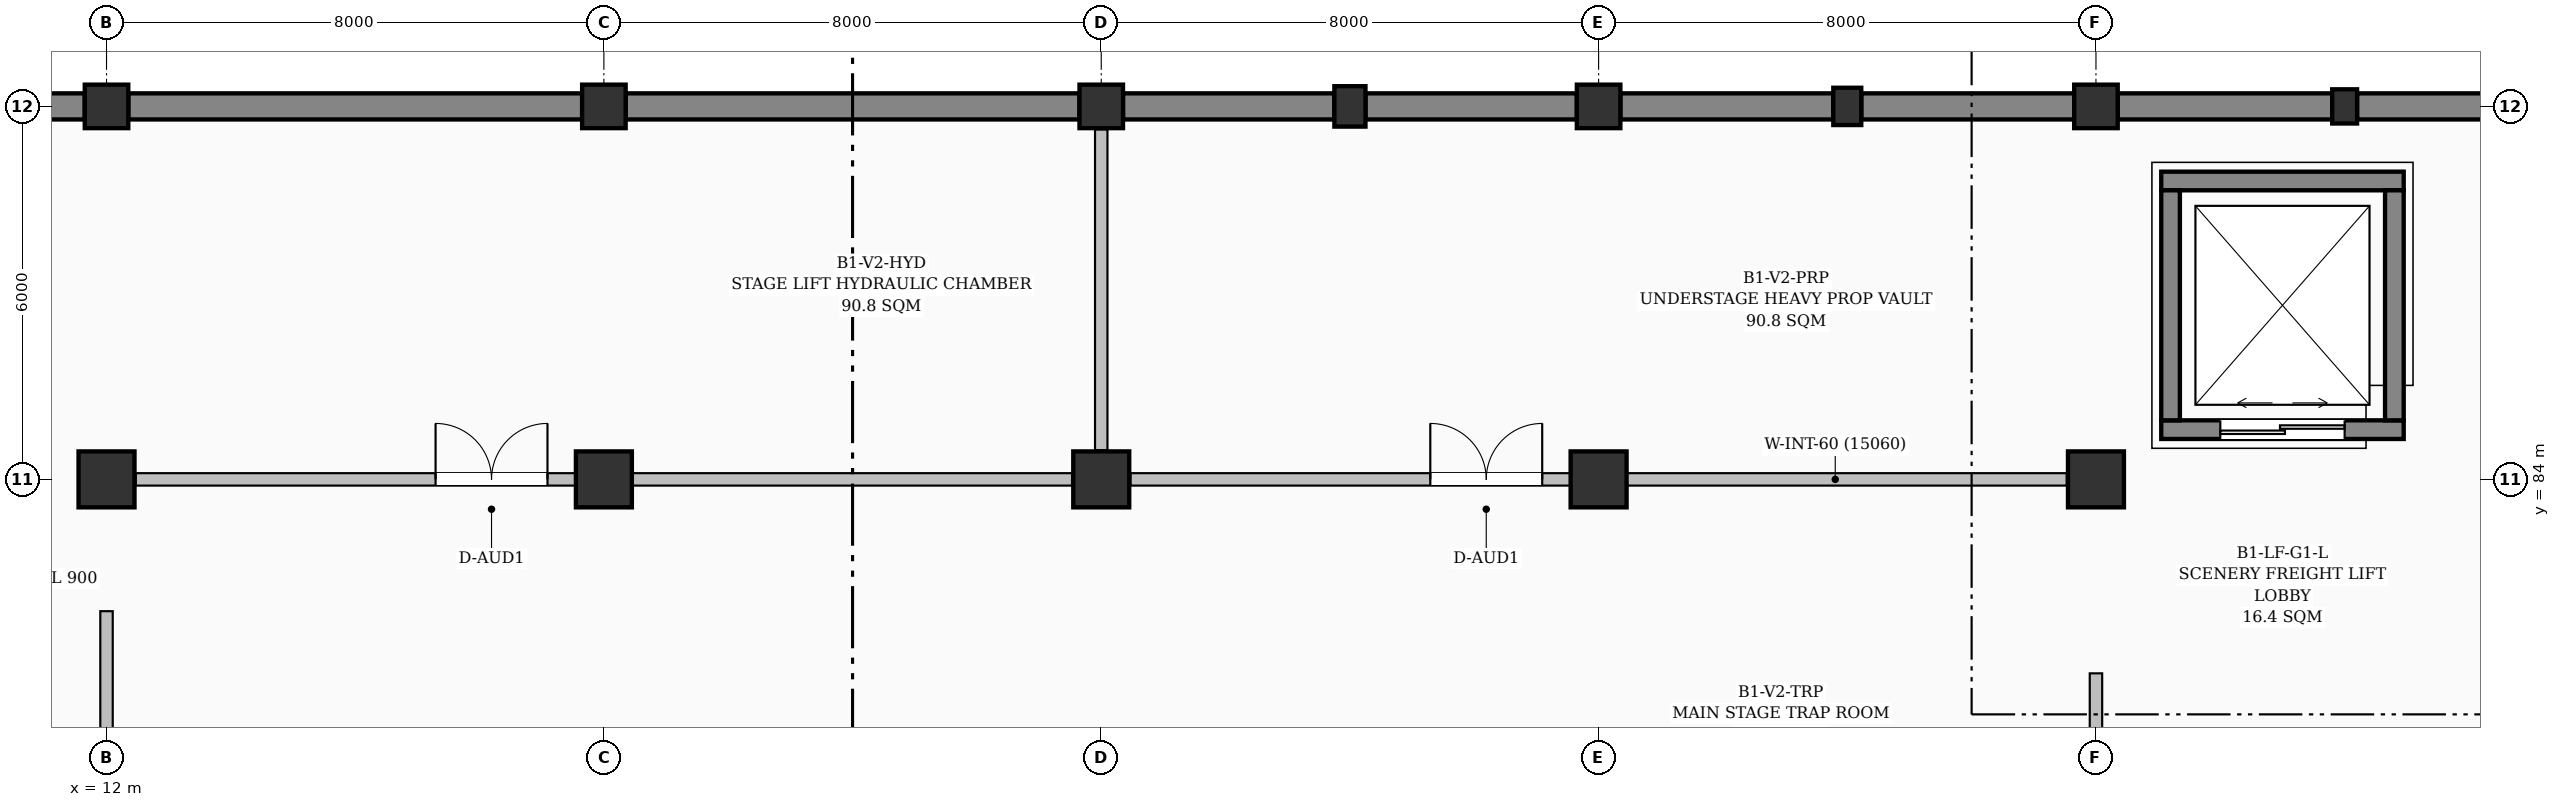
"""IFC4 building model, lengths in metres.
Left out: names, types, materials, properties, quantities, classifications, styles, units other than length and angle.
Written with IfcOpenShell. Run it as: python <this file> out.ifc"""

import sys

from ifc_helpers import new_model, si_unit, direction, frame, frame_2d, origin, origin_2d, place, context, subcontext, project, spatial, rectangle, extrude, element, fill, save


model = new_model("IFC4")
c1 = context("Model", 3, precision=1e-05, world=origin(), true_north=direction((0.0, 1.0)))
c2 = subcontext(c1, "Body", "Model", "MODEL_VIEW")
j1 = project(units=[si_unit("LENGTHUNIT", "METRE"), si_unit("PLANEANGLEUNIT", "RADIAN")], contexts=[c1])
p1 = place(None, origin())
s1 = spatial("IfcSite", under=j1, at=p1, CompositionType="ELEMENT")
p2 = place(p1, origin())
s2 = spatial("IfcBuilding", under=s1, at=p2, CompositionType="ELEMENT")
p3 = place(p2, frame((0.0, 0.0, -4.8)))
s3 = spatial("IfcBuildingStorey", under=s2, at=p3, CompositionType="ELEMENT", Elevation=-4.8)
p4 = place(p3, frame((12.0, 84.0, -0.38), z_axis=(0.0, 0.0, 1.0), x_axis=(1.0, 0.0, 0.0)))
e1 = element("IfcColumn", 1, at=p4, inside=s3, PredefinedType="COLUMN", context=c2, shape_type="SweptSolid", body=[
    extrude(rectangle(XDim=0.9, YDim=0.9, at=origin_2d()), origin(), (0.0, 0.0, 1.0), 5.18),
])
p5 = place(p3, frame((12.0, 90.0, -0.38), z_axis=(0.0, 0.0, 1.0), x_axis=(1.0, 0.0, 0.0)))
e2 = element("IfcColumn", 2, at=p5, inside=s3, PredefinedType="COLUMN", context=c2, shape_type="SweptSolid", body=[
    extrude(rectangle(XDim=0.7, YDim=0.7, at=origin_2d()), origin(), (0.0, 0.0, 1.0), 5.18),
])
p6 = place(p3, frame((20.0, 84.0, -0.38), z_axis=(0.0, 0.0, 1.0), x_axis=(1.0, 0.0, 0.0)))
e3 = element("IfcColumn", 3, at=p6, inside=s3, PredefinedType="COLUMN", context=c2, shape_type="SweptSolid", body=[
    extrude(rectangle(XDim=0.9, YDim=0.9, at=origin_2d()), origin(), (0.0, 0.0, 1.0), 5.18),
])
p7 = place(p3, frame((20.0, 90.0, -0.38), z_axis=(0.0, 0.0, 1.0), x_axis=(1.0, 0.0, 0.0)))
e4 = element("IfcColumn", 4, at=p7, inside=s3, PredefinedType="COLUMN", context=c2, shape_type="SweptSolid", body=[
    extrude(rectangle(XDim=0.7, YDim=0.7, at=origin_2d()), origin(), (0.0, 0.0, 1.0), 5.18),
])
p8 = place(p3, frame((28.0, 84.0, -0.38), z_axis=(0.0, 0.0, 1.0), x_axis=(1.0, 0.0, 0.0)))
e5 = element("IfcColumn", 5, at=p8, inside=s3, PredefinedType="COLUMN", context=c2, shape_type="SweptSolid", body=[
    extrude(rectangle(XDim=0.9, YDim=0.9, at=origin_2d()), origin(), (0.0, 0.0, 1.0), 5.18),
])
p9 = place(p3, frame((28.0, 90.0, -0.38), z_axis=(0.0, 0.0, 1.0), x_axis=(1.0, 0.0, 0.0)))
e6 = element("IfcColumn", 6, at=p9, inside=s3, PredefinedType="COLUMN", context=c2, shape_type="SweptSolid", body=[
    extrude(rectangle(XDim=0.7, YDim=0.7, at=origin_2d()), origin(), (0.0, 0.0, 1.0), 5.18),
])
p10 = place(p3, frame((32.0, 90.0, -0.38), z_axis=(0.0, 0.0, 1.0), x_axis=(1.0, 0.0, 0.0)))
e7 = element("IfcColumn", 7, at=p10, inside=s3, PredefinedType="PILASTER", context=c2, shape_type="SweptSolid", body=[
    extrude(rectangle(XDim=0.5, YDim=0.65, at=origin_2d()), origin(), (0.0, 0.0, 1.0), 5.18),
])
p11 = place(p3, frame((36.0, 84.0, -0.38), z_axis=(0.0, 0.0, 1.0), x_axis=(1.0, 0.0, 0.0)))
e8 = element("IfcColumn", 8, at=p11, inside=s3, PredefinedType="COLUMN", context=c2, shape_type="SweptSolid", body=[
    extrude(rectangle(XDim=0.9, YDim=0.9, at=origin_2d()), origin(), (0.0, 0.0, 1.0), 5.18),
])
p12 = place(p3, frame((36.0, 90.0, -0.38), z_axis=(0.0, 0.0, 1.0), x_axis=(1.0, 0.0, 0.0)))
e9 = element("IfcColumn", 9, at=p12, inside=s3, PredefinedType="COLUMN", context=c2, shape_type="SweptSolid", body=[
    extrude(rectangle(XDim=0.7, YDim=0.7, at=origin_2d()), origin(), (0.0, 0.0, 1.0), 5.18),
])
p13 = place(p3, frame((40.0, 90.0, -0.38), z_axis=(0.0, 0.0, 1.0), x_axis=(1.0, 0.0, 0.0)))
e10 = element("IfcColumn", 10, at=p13, inside=s3, PredefinedType="PILASTER", context=c2, shape_type="SweptSolid", body=[
    extrude(rectangle(XDim=0.45, YDim=0.6, at=origin_2d()), origin(), (0.0, 0.0, 1.0), 5.18),
])
p14 = place(p3, frame((44.0, 84.0, -0.38), z_axis=(0.0, 0.0, 1.0), x_axis=(1.0, 0.0, 0.0)))
e11 = element("IfcColumn", 11, at=p14, inside=s3, PredefinedType="COLUMN", context=c2, shape_type="SweptSolid", body=[
    extrude(rectangle(XDim=0.9, YDim=0.9, at=origin_2d()), origin(), (0.0, 0.0, 1.0), 5.18),
])
p15 = place(p3, frame((44.0, 90.0, -0.38), z_axis=(0.0, 0.0, 1.0), x_axis=(1.0, 0.0, 0.0)))
e12 = element("IfcColumn", 12, at=p15, inside=s3, PredefinedType="COLUMN", context=c2, shape_type="SweptSolid", body=[
    extrude(rectangle(XDim=0.7, YDim=0.7, at=origin_2d()), origin(), (0.0, 0.0, 1.0), 5.18),
])
p16 = place(p3, frame((48.0, 90.0, -0.38), z_axis=(0.0, 0.0, 1.0), x_axis=(1.0, 0.0, 0.0)))
e13 = element("IfcColumn", 13, at=p16, inside=s3, PredefinedType="PILASTER", context=c2, shape_type="SweptSolid", body=[
    extrude(rectangle(XDim=0.4, YDim=0.55, at=origin_2d()), origin(), (0.0, 0.0, 1.0), 5.18),
])
p17 = place(p3, frame((8.25, 90.0, 0.0), z_axis=(0.0, 0.0, 1.0), x_axis=(1.0, 0.0, 0.0)))
e14 = element("IfcWall", 14, at=p17, inside=s3, PredefinedType="USERDEFINED", context=c2, shape_type="SweptSolid", body=[
    extrude(rectangle(XDim=3.4, YDim=0.42, at=frame_2d((1.7, 0.0))), origin(), (0.0, 0.0, 1.0), 3.85),
])
for number, where, z_axis, x_axis in (
    (15, (12.35, 90.0, 0.0), (0.0, 0.0, 1.0), (1.0, 0.0, 0.0)),
    (16, (20.35, 90.0, 0.0), (0.0, 0.0, 1.0), (1.0, 0.0, 0.0)),
):
    element("IfcWall", number, at=place(p3, frame(where, z_axis=z_axis, x_axis=x_axis)), inside=s3, PredefinedType="USERDEFINED", context=c2, shape_type="SweptSolid", body=[
        extrude(rectangle(XDim=7.3, YDim=0.42, at=frame_2d((3.65, 0.0))), origin(), (0.0, 0.0, 1.0), 3.85),
    ])
for number, where, z_axis, x_axis in (
    (17, (28.35, 90.0, 0.0), (0.0, 0.0, 1.0), (1.0, 0.0, 0.0)),
    (18, (32.25, 90.0, 0.0), (0.0, 0.0, 1.0), (1.0, 0.0, 0.0)),
):
    element("IfcWall", number, at=place(p3, frame(where, z_axis=z_axis, x_axis=x_axis)), inside=s3, PredefinedType="USERDEFINED", context=c2, shape_type="SweptSolid", body=[
        extrude(rectangle(XDim=3.4, YDim=0.42, at=frame_2d((1.7, 0.0))), origin(), (0.0, 0.0, 1.0), 3.85),
    ])
for number, where, z_axis, x_axis in (
    (19, (36.35, 90.0, 0.0), (0.0, 0.0, 1.0), (1.0, 0.0, 0.0)),
    (20, (40.225, 90.0, 0.0), (0.0, 0.0, 1.0), (1.0, 0.0, 0.0)),
):
    element("IfcWall", number, at=place(p3, frame(where, z_axis=z_axis, x_axis=x_axis)), inside=s3, PredefinedType="USERDEFINED", context=c2, shape_type="SweptSolid", body=[
        extrude(rectangle(XDim=3.425, YDim=0.42, at=frame_2d((1.712, 0.0))), origin(), (0.0, 0.0, 1.0), 3.85),
    ])
for number, where, z_axis, x_axis in (
    (21, (44.35, 90.0, 0.0), (0.0, 0.0, 1.0), (1.0, 0.0, 0.0)),
    (22, (48.2, 90.0, 0.0), (0.0, 0.0, 1.0), (1.0, 0.0, 0.0)),
):
    element("IfcWall", number, at=place(p3, frame(where, z_axis=z_axis, x_axis=x_axis)), inside=s3, PredefinedType="USERDEFINED", context=c2, shape_type="SweptSolid", body=[
        extrude(rectangle(XDim=3.45, YDim=0.42, at=frame_2d((1.725, 0.0))), origin(), (0.0, 0.0, 1.0), 3.85),
    ])
p18 = place(p3, frame((45.05, 84.8, -1.2), z_axis=(0.0, 0.0, 1.0), x_axis=(1.0, 0.0, 0.0)))
e23 = element("IfcWall", 23, at=p18, inside=s3, PredefinedType="SHEAR", context=c2, shape_type="SweptSolid", body=[
    extrude(rectangle(XDim=3.9, YDim=0.3, at=frame_2d((1.95, 0.0))), origin(), (0.0, 0.0, 1.0), 5.7),
])
p19 = place(p18, frame((0.95, 0.0, 1.2)))
e24 = element("IfcOpeningElement", 24, at=p19, cuts=e23, PredefinedType="OPENING", context=c2, shape_type="SweptSolid", body=[
    extrude(rectangle(XDim=2.0, YDim=2.4, at=frame_2d((1.0, 1.2))), frame((0.0, 0.16, 0.0), z_axis=(0.0, -1.0, 0.0), x_axis=(1.0, 0.0, 0.0)), (0.0, 0.0, 1.0), 0.32),
])
p20 = place(p3, frame((48.95, 88.8, -1.2), z_axis=(0.0, 0.0, 1.0), x_axis=(-1.0, 0.0, 0.0)))
e25 = element("IfcWall", 25, at=p20, inside=s3, PredefinedType="SHEAR", context=c2, shape_type="SweptSolid", body=[
    extrude(rectangle(XDim=3.9, YDim=0.3, at=frame_2d((1.95, 0.0))), origin(), (0.0, 0.0, 1.0), 5.7),
])
for number, where, z_axis, x_axis in (
    (26, (45.2, 84.95, -1.2), (0.0, 0.0, 1.0), (0.0, 1.0, 0.0)),
    (27, (48.8, 88.65, -1.2), (0.0, 0.0, 1.0), (0.0, -1.0, 0.0)),
):
    element("IfcWall", number, at=place(p3, frame(where, z_axis=z_axis, x_axis=x_axis)), inside=s3, PredefinedType="SHEAR", context=c2, shape_type="SweptSolid", body=[
        extrude(rectangle(XDim=3.7, YDim=0.3, at=frame_2d((1.85, 0.0))), origin(), (0.0, 0.0, 1.0), 5.7),
    ])
p21 = place(p3, frame((12.47, 84.0, 0.0), z_axis=(0.0, 0.0, 1.0), x_axis=(1.0, 0.0, 0.0)))
e28 = element("IfcWall", 28, at=p21, inside=s3, PredefinedType="PARTITIONING", context=c2, shape_type="SweptSolid", body=[
    extrude(rectangle(XDim=15.06, YDim=0.2, at=frame_2d((7.53, 0.0))), origin(), (0.0, 0.0, 1.0), 3.635),
])
p22 = place(p21, frame((4.823, 0.0, 0.0)))
e29 = element("IfcOpeningElement", 29, at=p22, cuts=e28, PredefinedType="OPENING", context=c2, shape_type="SweptSolid", body=[
    extrude(rectangle(XDim=1.8, YDim=2.35, at=frame_2d((0.9, 1.175))), frame((0.0, 0.11, 0.0), z_axis=(0.0, -1.0, 0.0), x_axis=(1.0, 0.0, 0.0)), (0.0, 0.0, 1.0), 0.22),
])
p23 = place(p3, frame((28.47, 84.0, 0.0), z_axis=(0.0, 0.0, 1.0), x_axis=(1.0, 0.0, 0.0)))
e30 = element("IfcWall", 30, at=p23, inside=s3, PredefinedType="PARTITIONING", context=c2, shape_type="SweptSolid", body=[
    extrude(rectangle(XDim=15.06, YDim=0.2, at=frame_2d((7.53, 0.0))), origin(), (0.0, 0.0, 1.0), 4.155),
])
p24 = place(p23, frame((4.823, 0.0, 0.0)))
e31 = element("IfcOpeningElement", 31, at=p24, cuts=e30, PredefinedType="OPENING", context=c2, shape_type="SweptSolid", body=[
    extrude(rectangle(XDim=1.8, YDim=2.35, at=frame_2d((0.9, 1.175))), frame((0.0, 0.11, 0.0), z_axis=(0.0, -1.0, 0.0), x_axis=(1.0, 0.0, 0.0)), (0.0, 0.0, 1.0), 0.22),
])
p25 = place(p3, frame((12.0, 73.72, 0.0), z_axis=(0.0, 0.0, 1.0), x_axis=(0.0, 1.0, 0.0)))
e32 = element("IfcWall", 32, at=p25, inside=s3, PredefinedType="PARTITIONING", context=c2, shape_type="SweptSolid", body=[
    extrude(rectangle(XDim=8.16, YDim=0.2, at=frame_2d((4.08, 0.0))), origin(), (0.0, 0.0, 1.0), 4.095),
])
p26 = place(p25, frame((4.159, 0.0, 0.0)))
e33 = element("IfcOpeningElement", 33, at=p26, cuts=e32, PredefinedType="OPENING", context=c2, shape_type="SweptSolid", body=[
    extrude(rectangle(XDim=1.8, YDim=2.35, at=frame_2d((0.9, 1.175))), frame((0.0, 0.11, 0.0), z_axis=(0.0, -1.0, 0.0), x_axis=(1.0, 0.0, 0.0)), (0.0, 0.0, 1.0), 0.22),
])
p27 = place(p3, frame((44.0, 77.12, 0.0), z_axis=(0.0, 0.0, 1.0), x_axis=(0.0, 1.0, 0.0)))
e34 = element("IfcWall", 34, at=p27, inside=s3, PredefinedType="PARTITIONING", context=c2, shape_type="SweptSolid", body=[
    extrude(rectangle(XDim=3.76, YDim=0.2, at=frame_2d((1.88, 0.0))), origin(), (0.0, 0.0, 1.0), 4.095),
])
p28 = place(p27, frame((0.98, 0.0, 0.0)))
e35 = element("IfcOpeningElement", 35, at=p28, cuts=e34, PredefinedType="OPENING", context=c2, shape_type="SweptSolid", body=[
    extrude(rectangle(XDim=1.8, YDim=2.35, at=frame_2d((0.9, 1.175))), frame((0.0, 0.11, 0.0), z_axis=(0.0, -1.0, 0.0), x_axis=(1.0, 0.0, 0.0)), (0.0, 0.0, 1.0), 0.22),
])
p29 = place(p3, frame((28.0, 84.47, 0.0), z_axis=(0.0, 0.0, 1.0), x_axis=(0.0, 1.0, 0.0)))
e36 = element("IfcWall", 36, at=p29, inside=s3, PredefinedType="PARTITIONING", context=c2, shape_type="SweptSolid", body=[
    extrude(rectangle(XDim=5.16, YDim=0.2, at=frame_2d((2.58, 0.0))), origin(), (0.0, 0.0, 1.0), 3.635),
])
p30 = place(p19, origin())
e37 = element("IfcDoor", 37, at=p30, inside=s3, OperationType="DOUBLE_DOOR_SLIDING", PredefinedType="DOOR", context=c2, shape_type="SweptSolid", body=[
    extrude(rectangle(XDim=2.0, YDim=2.4, at=frame_2d((1.0, 1.2))), frame((0.0, 0.025, 0.0), z_axis=(0.0, -1.0, 0.0), x_axis=(1.0, 0.0, 0.0)), (0.0, 0.0, 1.0), 0.05),
])
fill(e24, e37)
p31 = place(p22, origin())
e38 = element("IfcDoor", 38, at=p31, inside=s3, OperationType="DOUBLE_DOOR_SINGLE_SWING", PredefinedType="DOOR", context=c2, shape_type="SweptSolid", body=[
    extrude(rectangle(XDim=1.8, YDim=2.35, at=frame_2d((0.9, 1.175))), frame((0.0, 0.025, 0.0), z_axis=(0.0, -1.0, 0.0), x_axis=(1.0, 0.0, 0.0)), (0.0, 0.0, 1.0), 0.05),
])
fill(e29, e38)
p32 = place(p24, origin())
e39 = element("IfcDoor", 39, at=p32, inside=s3, OperationType="DOUBLE_DOOR_SINGLE_SWING", PredefinedType="DOOR", context=c2, shape_type="SweptSolid", body=[
    extrude(rectangle(XDim=1.8, YDim=2.35, at=frame_2d((0.9, 1.175))), frame((0.0, 0.025, 0.0), z_axis=(0.0, -1.0, 0.0), x_axis=(1.0, 0.0, 0.0)), (0.0, 0.0, 1.0), 0.05),
])
fill(e31, e39)
save(model, sys.argv[1])
